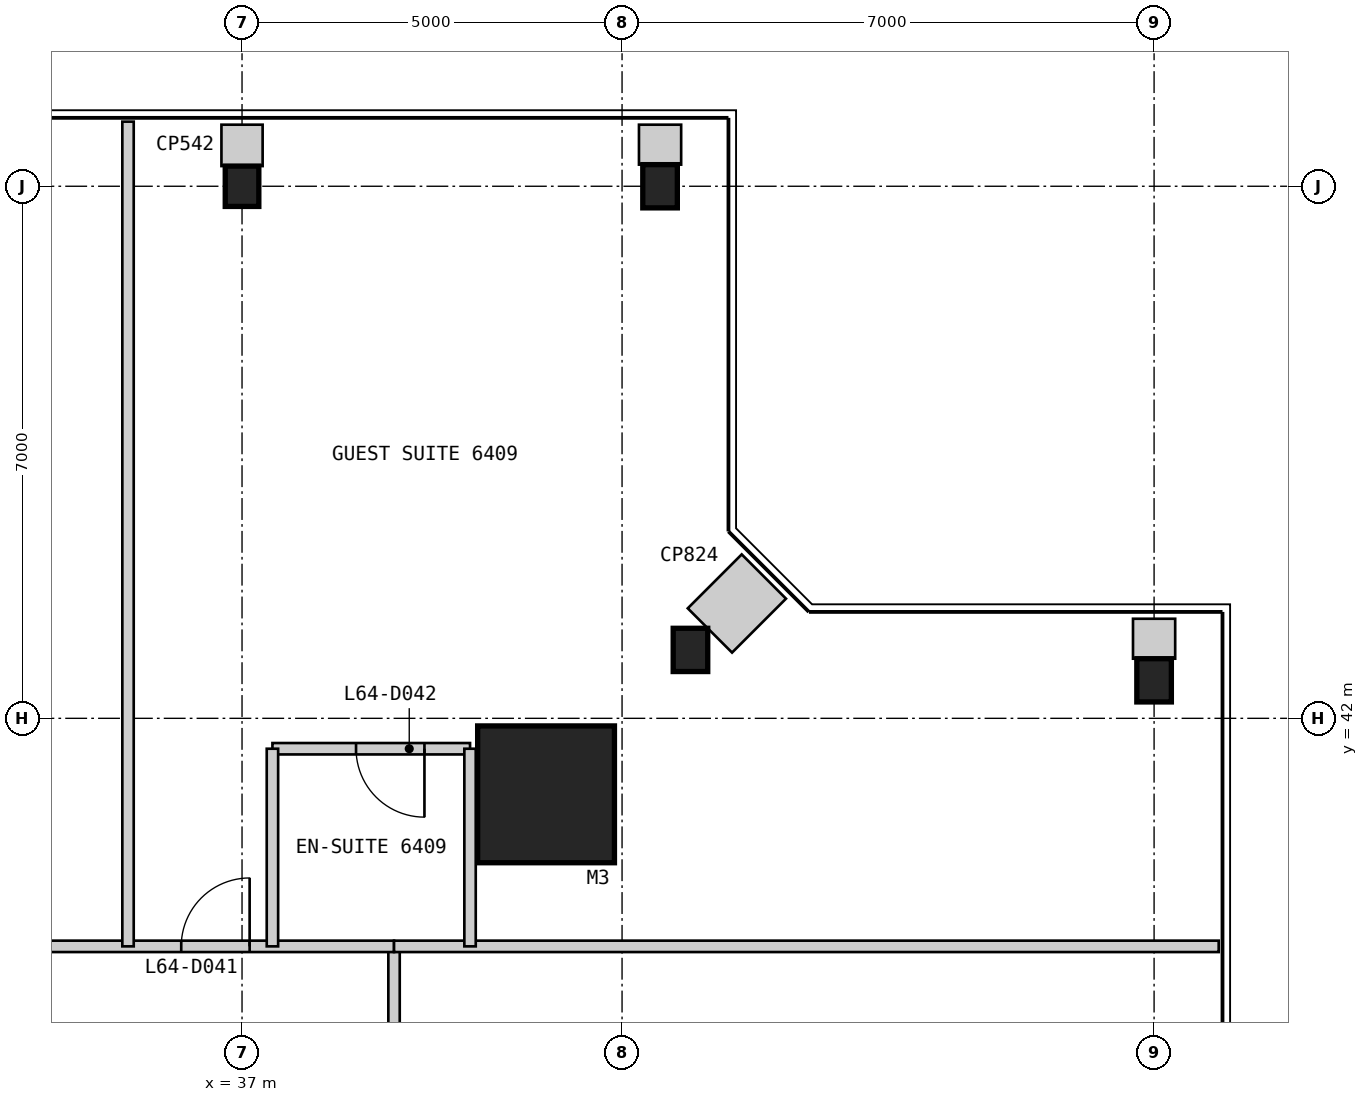
"""IFC4 building model, lengths in metres.
Left out: names, types, materials, properties, quantities, classifications, styles, units other than length and angle.
Written with IfcOpenShell. Run it as: python <this file> out.ifc"""

import sys

from ifc_helpers import new_model, si_unit, direction, frame, frame_2d, origin, origin_2d, place, context, subcontext, project, spatial, rectangle, i_section, extrude, element, fill, save


model = new_model("IFC4")
c1 = context("Model", 3, precision=1e-05, world=origin(), true_north=direction((0.0, 1.0)))
c2 = subcontext(c1, "Body", "Model", "MODEL_VIEW")
j1 = project(units=[si_unit("LENGTHUNIT", "METRE"), si_unit("PLANEANGLEUNIT", "RADIAN")], contexts=[c1])
p1 = place(None, origin())
s1 = spatial("IfcSite", under=j1, at=p1, CompositionType="ELEMENT")
p2 = place(p1, origin())
s2 = spatial("IfcBuilding", under=s1, at=p2, CompositionType="ELEMENT")
p3 = place(p2, frame((0.0, 0.0, 269.6)))
s3 = spatial("IfcBuildingStorey", under=s2, at=p3, CompositionType="ELEMENT", Elevation=269.6)
p4 = place(p3, frame((41.0, 41.0, 0.0), z_axis=(0.0, 0.0, 1.0), x_axis=(1.0, 0.0, 0.0)))
e1 = element("IfcColumn", 1, at=p4, inside=s3, PredefinedType="COLUMN", context=c2, shape_type="SweptSolid", body=[
    extrude(rectangle(XDim=1.8, YDim=1.8, at=origin_2d()), origin(), (0.0, 0.0, 1.0), 3.4),
])
for number, where, z_axis, x_axis in (
    (2, (49.0, 42.5, 0.0), (0.0, 0.0, 1.0), (1.0, 0.0, 0.0)),
    (3, (42.9, 42.9, 0.0), (0.0, 0.0, 1.0), (1.0, 0.0, 0.0)),
    (4, (42.5, 49.0, 0.0), (0.0, 0.0, 1.0), (1.0, 0.0, 0.0)),
):
    element("IfcColumn", number, at=place(p3, frame(where, z_axis=z_axis, x_axis=x_axis)), inside=s3, PredefinedType="COLUMN", context=c2, shape_type="SweptSolid", body=[
        extrude(i_section(OverallWidth=0.455, OverallDepth=0.569, WebThickness=0.078, FlangeThickness=0.125, at=origin_2d()), origin(), (0.0, 0.0, 1.0), 3.4),
    ])
p5 = place(p3, frame((37.0, 49.0, 0.0), z_axis=(0.0, 0.0, 1.0), x_axis=(1.0, 0.0, 0.0)))
e5 = element("IfcColumn", 5, at=p5, inside=s3, PredefinedType="COLUMN", context=c2, shape_type="SweptSolid", body=[
    extrude(i_section(OverallWidth=0.442, OverallDepth=0.531, WebThickness=0.066, FlangeThickness=0.106, at=origin_2d()), origin(), (0.0, 0.0, 1.0), 3.4),
])
p6 = place(p3, frame((39.0, 11.0, 0.0), z_axis=(0.0, 0.0, 1.0), x_axis=(0.0, 1.0, 0.0)))
e6 = element("IfcWall", 6, at=p6, inside=s3, PredefinedType="PARTITIONING", context=c2, shape_type="SweptSolid", body=[
    extrude(rectangle(XDim=28.0, YDim=0.15, at=frame_2d((14.0, 0.0))), origin(), (0.0, 0.0, 1.0), 2.844),
])
p7 = place(p6, frame((2.075, 0.0, 0.0)))
e7 = element("IfcOpeningElement", 7, at=p7, cuts=e6, PredefinedType="OPENING", context=c2, shape_type="SweptSolid", body=[
    extrude(rectangle(XDim=0.9, YDim=2.1, at=frame_2d((0.45, 1.05))), frame((0.0, 0.085, 0.0), z_axis=(0.0, -1.0, 0.0), x_axis=(1.0, 0.0, 0.0)), (0.0, 0.0, 1.0), 0.17),
])
p8 = place(p6, frame((5.2, 0.0, 0.0)))
e8 = element("IfcOpeningElement", 8, at=p8, cuts=e6, PredefinedType="OPENING", context=c2, shape_type="SweptSolid", body=[
    extrude(rectangle(XDim=0.9, YDim=2.1, at=frame_2d((0.45, 1.05))), frame((0.0, 0.085, 0.0), z_axis=(0.0, -1.0, 0.0), x_axis=(1.0, 0.0, 0.0)), (0.0, 0.0, 1.0), 0.17),
])
p9 = place(p6, frame((13.3, 0.0, 0.0)))
e9 = element("IfcOpeningElement", 9, at=p9, cuts=e6, PredefinedType="OPENING", context=c2, shape_type="SweptSolid", body=[
    extrude(rectangle(XDim=0.9, YDim=2.1, at=frame_2d((0.45, 1.05))), frame((0.0, 0.085, 0.0), z_axis=(0.0, -1.0, 0.0), x_axis=(1.0, 0.0, 0.0)), (0.0, 0.0, 1.0), 0.17),
])
p10 = place(p6, frame((24.9, 0.0, 0.0)))
e10 = element("IfcOpeningElement", 10, at=p10, cuts=e6, PredefinedType="OPENING", context=c2, shape_type="SweptSolid", body=[
    extrude(rectangle(XDim=0.9, YDim=2.1, at=frame_2d((0.45, 1.05))), frame((0.0, 0.085, 0.0), z_axis=(0.0, -1.0, 0.0), x_axis=(1.0, 0.0, 0.0)), (0.0, 0.0, 1.0), 0.17),
])
p11 = place(p3, frame((39.0, 39.0, 0.0), z_axis=(0.0, 0.0, 1.0), x_axis=(-1.0, 0.0, 0.0)))
e11 = element("IfcWall", 11, at=p11, inside=s3, PredefinedType="PARTITIONING", context=c2, shape_type="SweptSolid", body=[
    extrude(rectangle(XDim=28.0, YDim=0.15, at=frame_2d((14.0, 0.0))), origin(), (0.0, 0.0, 1.0), 2.844),
])
p12 = place(p11, frame((1.9, 0.0, 0.0)))
e12 = element("IfcOpeningElement", 12, at=p12, cuts=e11, PredefinedType="OPENING", context=c2, shape_type="SweptSolid", body=[
    extrude(rectangle(XDim=0.9, YDim=2.1, at=frame_2d((0.45, 1.05))), frame((0.0, 0.085, 0.0), z_axis=(0.0, -1.0, 0.0), x_axis=(1.0, 0.0, 0.0)), (0.0, 0.0, 1.0), 0.17),
])
p13 = place(p11, frame((5.2, 0.0, 0.0)))
e13 = element("IfcOpeningElement", 13, at=p13, cuts=e11, PredefinedType="OPENING", context=c2, shape_type="SweptSolid", body=[
    extrude(rectangle(XDim=0.9, YDim=2.1, at=frame_2d((0.45, 1.05))), frame((0.0, 0.085, 0.0), z_axis=(0.0, -1.0, 0.0), x_axis=(1.0, 0.0, 0.0)), (0.0, 0.0, 1.0), 0.17),
])
p14 = place(p11, frame((13.3, 0.0, 0.0)))
e14 = element("IfcOpeningElement", 14, at=p14, cuts=e11, PredefinedType="OPENING", context=c2, shape_type="SweptSolid", body=[
    extrude(rectangle(XDim=0.9, YDim=2.1, at=frame_2d((0.45, 1.05))), frame((0.0, 0.085, 0.0), z_axis=(0.0, -1.0, 0.0), x_axis=(1.0, 0.0, 0.0)), (0.0, 0.0, 1.0), 0.17),
])
p15 = place(p11, frame((24.9, 0.0, 0.0)))
e15 = element("IfcOpeningElement", 15, at=p15, cuts=e11, PredefinedType="OPENING", context=c2, shape_type="SweptSolid", body=[
    extrude(rectangle(XDim=0.9, YDim=2.1, at=frame_2d((0.45, 1.05))), frame((0.0, 0.085, 0.0), z_axis=(0.0, -1.0, 0.0), x_axis=(1.0, 0.0, 0.0)), (0.0, 0.0, 1.0), 0.17),
])
p16 = place(p3, frame((49.85, 39.0, 0.0), z_axis=(0.0, 0.0, 1.0), x_axis=(-1.0, 0.0, 0.0)))
e16 = element("IfcWall", 16, at=p16, inside=s3, PredefinedType="PARTITIONING", context=c2, shape_type="SweptSolid", body=[
    extrude(rectangle(XDim=10.85, YDim=0.15, at=frame_2d((5.425, 0.0))), origin(), (0.0, 0.0, 1.0), 2.844),
])
p17 = place(p3, frame((40.0, 41.6, 0.0), z_axis=(0.0, 0.0, 1.0), x_axis=(-1.0, 0.0, 0.0)))
e17 = element("IfcWall", 17, at=p17, inside=s3, PredefinedType="PARTITIONING", context=c2, shape_type="SweptSolid", body=[
    extrude(rectangle(XDim=2.6, YDim=0.15, at=frame_2d((1.3, 0.0))), origin(), (0.0, 0.0, 1.0), 3.25),
])
p18 = place(p17, frame((0.6, 0.0, 0.0)))
e18 = element("IfcOpeningElement", 18, at=p18, cuts=e17, PredefinedType="OPENING", context=c2, shape_type="SweptSolid", body=[
    extrude(rectangle(XDim=0.9, YDim=2.1, at=frame_2d((0.45, 1.05))), frame((0.0, 0.085, 0.0), z_axis=(0.0, -1.0, 0.0), x_axis=(1.0, 0.0, 0.0)), (0.0, 0.0, 1.0), 0.17),
])
for number, where, z_axis, x_axis in (
    (19, (40.0, 41.6, 0.0), (0.0, 0.0, 1.0), (0.0, -1.0, 0.0)),
    (20, (37.4, 41.6, 0.0), (0.0, 0.0, 1.0), (0.0, -1.0, 0.0)),
):
    element("IfcWall", number, at=place(p3, frame(where, z_axis=z_axis, x_axis=x_axis)), inside=s3, PredefinedType="PARTITIONING", context=c2, shape_type="SweptSolid", body=[
        extrude(rectangle(XDim=2.6, YDim=0.15, at=frame_2d((1.3, 0.0))), origin(), (0.0, 0.0, 1.0), 3.25),
    ])
p19 = place(p3, frame((35.5, 49.85, 0.0), z_axis=(0.0, 0.0, 1.0), x_axis=(0.0, -1.0, 0.0)))
e21 = element("IfcWall", 21, at=p19, inside=s3, PredefinedType="PARTITIONING", context=c2, shape_type="SweptSolid", body=[
    extrude(rectangle(XDim=10.85, YDim=0.15, at=frame_2d((5.425, 0.0))), origin(), (0.0, 0.0, 1.0), 3.25),
])
p20 = place(p3, frame((49.0, 43.31, 0.0), z_axis=(0.0, 0.0, 1.0), x_axis=(0.0, -1.0, 0.0)))
e22 = element("IfcWall", 22, at=p20, inside=s3, PredefinedType="PARTITIONING", context=c2, shape_type="SweptSolid", body=[
    extrude(rectangle(XDim=0.526, YDim=0.555, at=frame_2d((0.263, 0.0))), origin(), (0.0, 0.0, 1.0), 3.25),
])
p21 = place(p3, frame((43.866, 43.866, 0.0), z_axis=(0.0, 0.0, 1.0), x_axis=(-0.707106781187, -0.707106781187, 0.0)))
e23 = element("IfcWall", 23, at=p21, inside=s3, PredefinedType="PARTITIONING", context=c2, shape_type="SweptSolid", body=[
    extrude(rectangle(XDim=1.004, YDim=0.824, at=frame_2d((0.502, 0.0))), origin(), (0.0, 0.0, 1.0), 3.25),
])
p22 = place(p3, frame((42.5, 49.81, 0.0), z_axis=(0.0, 0.0, 1.0), x_axis=(0.0, -1.0, 0.0)))
e24 = element("IfcWall", 24, at=p22, inside=s3, PredefinedType="PARTITIONING", context=c2, shape_type="SweptSolid", body=[
    extrude(rectangle(XDim=0.526, YDim=0.555, at=frame_2d((0.263, 0.0))), origin(), (0.0, 0.0, 1.0), 3.25),
])
p23 = place(p3, frame((37.0, 49.81, 0.0), z_axis=(0.0, 0.0, 1.0), x_axis=(0.0, -1.0, 0.0)))
e25 = element("IfcWall", 25, at=p23, inside=s3, PredefinedType="PARTITIONING", context=c2, shape_type="SweptSolid", body=[
    extrude(rectangle(XDim=0.545, YDim=0.542, at=frame_2d((0.272, 0.0))), origin(), (0.0, 0.0, 1.0), 3.25),
])
p24 = place(p12, frame((0.9, 0.0, 0.0), z_axis=(0.0, 0.0, 1.0), x_axis=(-1.0, 0.0, 0.0)))
e26 = element("IfcDoor", 26, at=p24, inside=s3, OperationType="SINGLE_SWING_RIGHT", PredefinedType="DOOR", context=c2, shape_type="SweptSolid", body=[
    extrude(rectangle(XDim=0.9, YDim=2.1, at=frame_2d((0.45, 1.05))), frame((0.0, 0.025, 0.0), z_axis=(0.0, -1.0, 0.0), x_axis=(1.0, 0.0, 0.0)), (0.0, 0.0, 1.0), 0.05),
])
fill(e12, e26)
p25 = place(p18, origin())
e27 = element("IfcDoor", 27, at=p25, inside=s3, OperationType="SINGLE_SWING_LEFT", PredefinedType="DOOR", context=c2, shape_type="SweptSolid", body=[
    extrude(rectangle(XDim=0.9, YDim=2.1, at=frame_2d((0.45, 1.05))), frame((0.0, 0.025, 0.0), z_axis=(0.0, -1.0, 0.0), x_axis=(1.0, 0.0, 0.0)), (0.0, 0.0, 1.0), 0.05),
])
fill(e18, e27)
save(model, sys.argv[1])
